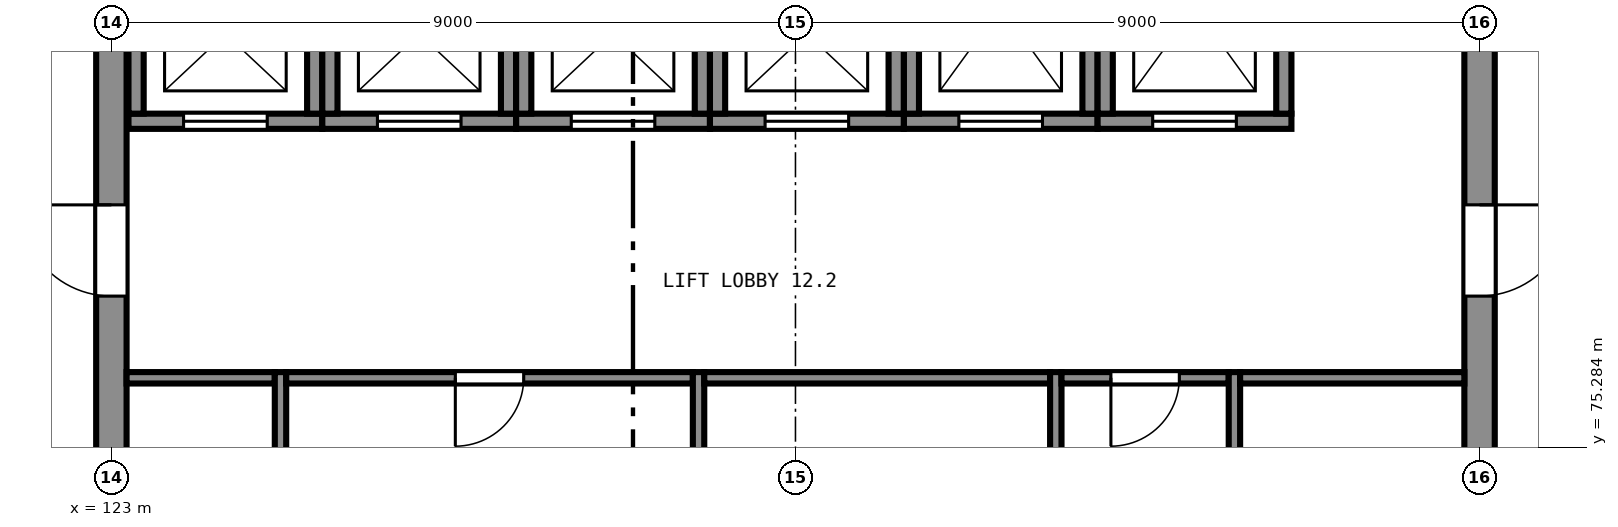
"""IFC4 building model, lengths in metres.
Left out: names, types, materials, properties, quantities, classifications, styles, units other than length and angle.
Written with IfcOpenShell. Run it as: python <this file> out.ifc"""

import sys

from ifc_helpers import new_model, si_unit, direction, frame, frame_2d, origin, place, context, subcontext, project, spatial, rectangle, extrude, element, fill, save


model = new_model("IFC4")
c1 = context("Model", 3, precision=1e-05, world=origin(), true_north=direction((0.0, 1.0)))
c2 = subcontext(c1, "Body", "Model", "MODEL_VIEW")
j1 = project(units=[si_unit("LENGTHUNIT", "METRE"), si_unit("PLANEANGLEUNIT", "RADIAN")], contexts=[c1])
p1 = place(None, origin())
s1 = spatial("IfcSite", under=j1, at=p1, CompositionType="ELEMENT")
p2 = place(p1, origin())
s2 = spatial("IfcBuilding", under=s1, at=p2, CompositionType="ELEMENT")
p3 = place(p2, frame((0.0, 0.0, 49.5)))
s3 = spatial("IfcBuildingStorey", under=s2, at=p3, CompositionType="ELEMENT", Elevation=49.5)
p4 = place(p3, frame((141.0, 65.2, 0.0), z_axis=(0.0, 0.0, 1.0), x_axis=(0.0, 1.0, 0.0)))
e1 = element("IfcWall", 1, at=p4, inside=s3, PredefinedType="SHEAR", context=c2, shape_type="SweptSolid", body=[
    extrude(rectangle(XDim=17.6, YDim=0.4, at=frame_2d((8.8, 0.0))), origin(), (0.0, 0.0, 1.0), 4.0),
])
p5 = place(p4, frame((4.325, 0.0, 0.0)))
e2 = element("IfcOpeningElement", 2, at=p5, cuts=e1, PredefinedType="OPENING", context=c2, shape_type="SweptSolid", body=[
    extrude(rectangle(XDim=1.2, YDim=2.1, at=frame_2d((0.6, 1.05))), frame((0.0, 0.21, 0.0), z_axis=(0.0, -1.0, 0.0), x_axis=(1.0, 0.0, 0.0)), (0.0, 0.0, 1.0), 0.42),
])
p6 = place(p4, frame((12.075, 0.0, 0.0)))
e3 = element("IfcOpeningElement", 3, at=p6, cuts=e1, PredefinedType="OPENING", context=c2, shape_type="SweptSolid", body=[
    extrude(rectangle(XDim=1.2, YDim=2.1, at=frame_2d((0.6, 1.05))), frame((0.0, 0.21, 0.0), z_axis=(0.0, -1.0, 0.0), x_axis=(1.0, 0.0, 0.0)), (0.0, 0.0, 1.0), 0.42),
])
p7 = place(p3, frame((123.0, 82.8, 0.0), z_axis=(0.0, 0.0, 1.0), x_axis=(0.0, -1.0, 0.0)))
e4 = element("IfcWall", 4, at=p7, inside=s3, PredefinedType="SHEAR", context=c2, shape_type="SweptSolid", body=[
    extrude(rectangle(XDim=17.6, YDim=0.4, at=frame_2d((8.8, 0.0))), origin(), (0.0, 0.0, 1.0), 4.0),
])
p8 = place(p7, frame((12.075, 0.0, 0.0)))
e5 = element("IfcOpeningElement", 5, at=p8, cuts=e4, PredefinedType="OPENING", context=c2, shape_type="SweptSolid", body=[
    extrude(rectangle(XDim=1.2, YDim=2.1, at=frame_2d((0.6, 1.05))), frame((0.0, 0.21, 0.0), z_axis=(0.0, -1.0, 0.0), x_axis=(1.0, 0.0, 0.0)), (0.0, 0.0, 1.0), 0.42),
])
p9 = place(p7, frame((4.325, 0.0, 0.0)))
e6 = element("IfcOpeningElement", 6, at=p9, cuts=e4, PredefinedType="OPENING", context=c2, shape_type="SweptSolid", body=[
    extrude(rectangle(XDim=1.2, YDim=2.1, at=frame_2d((0.6, 1.05))), frame((0.0, 0.21, 0.0), z_axis=(0.0, -1.0, 0.0), x_axis=(1.0, 0.0, 0.0)), (0.0, 0.0, 1.0), 0.42),
])
p10 = place(p3, frame((123.225, 79.575, 0.0), z_axis=(0.0, 0.0, 1.0), x_axis=(1.0, 0.0, 0.0)))
e7 = element("IfcWall", 7, at=p10, inside=s3, PredefinedType="SHEAR", context=c2, shape_type="SweptSolid", body=[
    extrude(rectangle(XDim=2.55, YDim=0.2, at=frame_2d((1.275, 0.0))), origin(), (0.0, 0.0, 1.0), 4.0),
])
p11 = place(p10, frame((0.725, 0.0, 0.0)))
e8 = element("IfcOpeningElement", 8, at=p11, cuts=e7, PredefinedType="OPENING", context=c2, shape_type="SweptSolid", body=[
    extrude(rectangle(XDim=1.1, YDim=2.1, at=frame_2d((0.55, 1.05))), frame((0.0, 0.11, 0.0), z_axis=(0.0, -1.0, 0.0), x_axis=(1.0, 0.0, 0.0)), (0.0, 0.0, 1.0), 0.22),
])
for number, where, z_axis, x_axis in (
    (9, (125.675, 79.675, 0.0), (0.0, 0.0, 1.0), (0.0, 1.0, 0.0)),
    (10, (123.325, 81.775, 0.0), (0.0, 0.0, 1.0), (0.0, -1.0, 0.0)),
):
    element("IfcWall", number, at=place(p3, frame(where, z_axis=z_axis, x_axis=x_axis)), inside=s3, PredefinedType="SHEAR", context=c2, shape_type="SweptSolid", body=[
        extrude(rectangle(XDim=2.1, YDim=0.2, at=frame_2d((1.05, 0.0))), origin(), (0.0, 0.0, 1.0), 4.0),
    ])
p12 = place(p3, frame((125.775, 79.575, 0.0), z_axis=(0.0, 0.0, 1.0), x_axis=(1.0, 0.0, 0.0)))
e11 = element("IfcWall", 11, at=p12, inside=s3, PredefinedType="SHEAR", context=c2, shape_type="SweptSolid", body=[
    extrude(rectangle(XDim=2.55, YDim=0.2, at=frame_2d((1.275, 0.0))), origin(), (0.0, 0.0, 1.0), 4.0),
])
p13 = place(p12, frame((0.725, 0.0, 0.0)))
e12 = element("IfcOpeningElement", 12, at=p13, cuts=e11, PredefinedType="OPENING", context=c2, shape_type="SweptSolid", body=[
    extrude(rectangle(XDim=1.1, YDim=2.1, at=frame_2d((0.55, 1.05))), frame((0.0, 0.11, 0.0), z_axis=(0.0, -1.0, 0.0), x_axis=(1.0, 0.0, 0.0)), (0.0, 0.0, 1.0), 0.22),
])
for number, where, z_axis, x_axis in (
    (13, (128.225, 79.675, 0.0), (0.0, 0.0, 1.0), (0.0, 1.0, 0.0)),
    (14, (125.875, 81.775, 0.0), (0.0, 0.0, 1.0), (0.0, -1.0, 0.0)),
):
    element("IfcWall", number, at=place(p3, frame(where, z_axis=z_axis, x_axis=x_axis)), inside=s3, PredefinedType="SHEAR", context=c2, shape_type="SweptSolid", body=[
        extrude(rectangle(XDim=2.1, YDim=0.2, at=frame_2d((1.05, 0.0))), origin(), (0.0, 0.0, 1.0), 4.0),
    ])
p14 = place(p3, frame((128.325, 79.575, 0.0), z_axis=(0.0, 0.0, 1.0), x_axis=(1.0, 0.0, 0.0)))
e15 = element("IfcWall", 15, at=p14, inside=s3, PredefinedType="SHEAR", context=c2, shape_type="SweptSolid", body=[
    extrude(rectangle(XDim=2.55, YDim=0.2, at=frame_2d((1.275, 0.0))), origin(), (0.0, 0.0, 1.0), 4.0),
])
p15 = place(p14, frame((0.725, 0.0, 0.0)))
e16 = element("IfcOpeningElement", 16, at=p15, cuts=e15, PredefinedType="OPENING", context=c2, shape_type="SweptSolid", body=[
    extrude(rectangle(XDim=1.1, YDim=2.1, at=frame_2d((0.55, 1.05))), frame((0.0, 0.11, 0.0), z_axis=(0.0, -1.0, 0.0), x_axis=(1.0, 0.0, 0.0)), (0.0, 0.0, 1.0), 0.22),
])
for number, where, z_axis, x_axis in (
    (17, (130.775, 79.675, 0.0), (0.0, 0.0, 1.0), (0.0, 1.0, 0.0)),
    (18, (128.425, 81.775, 0.0), (0.0, 0.0, 1.0), (0.0, -1.0, 0.0)),
):
    element("IfcWall", number, at=place(p3, frame(where, z_axis=z_axis, x_axis=x_axis)), inside=s3, PredefinedType="SHEAR", context=c2, shape_type="SweptSolid", body=[
        extrude(rectangle(XDim=2.1, YDim=0.2, at=frame_2d((1.05, 0.0))), origin(), (0.0, 0.0, 1.0), 4.0),
    ])
p16 = place(p3, frame((130.875, 79.575, 0.0), z_axis=(0.0, 0.0, 1.0), x_axis=(1.0, 0.0, 0.0)))
e19 = element("IfcWall", 19, at=p16, inside=s3, PredefinedType="SHEAR", context=c2, shape_type="SweptSolid", body=[
    extrude(rectangle(XDim=2.55, YDim=0.2, at=frame_2d((1.275, 0.0))), origin(), (0.0, 0.0, 1.0), 4.0),
])
p17 = place(p16, frame((0.725, 0.0, 0.0)))
e20 = element("IfcOpeningElement", 20, at=p17, cuts=e19, PredefinedType="OPENING", context=c2, shape_type="SweptSolid", body=[
    extrude(rectangle(XDim=1.1, YDim=2.1, at=frame_2d((0.55, 1.05))), frame((0.0, 0.11, 0.0), z_axis=(0.0, -1.0, 0.0), x_axis=(1.0, 0.0, 0.0)), (0.0, 0.0, 1.0), 0.22),
])
for number, where, z_axis, x_axis in (
    (21, (133.325, 79.675, 0.0), (0.0, 0.0, 1.0), (0.0, 1.0, 0.0)),
    (22, (130.975, 81.775, 0.0), (0.0, 0.0, 1.0), (0.0, -1.0, 0.0)),
):
    element("IfcWall", number, at=place(p3, frame(where, z_axis=z_axis, x_axis=x_axis)), inside=s3, PredefinedType="SHEAR", context=c2, shape_type="SweptSolid", body=[
        extrude(rectangle(XDim=2.1, YDim=0.2, at=frame_2d((1.05, 0.0))), origin(), (0.0, 0.0, 1.0), 4.0),
    ])
p18 = place(p3, frame((133.425, 79.575, 0.0), z_axis=(0.0, 0.0, 1.0), x_axis=(1.0, 0.0, 0.0)))
e23 = element("IfcWall", 23, at=p18, inside=s3, PredefinedType="SHEAR", context=c2, shape_type="SweptSolid", body=[
    extrude(rectangle(XDim=2.55, YDim=0.2, at=frame_2d((1.275, 0.0))), origin(), (0.0, 0.0, 1.0), 4.0),
])
p19 = place(p18, frame((0.725, 0.0, 0.0)))
e24 = element("IfcOpeningElement", 24, at=p19, cuts=e23, PredefinedType="OPENING", context=c2, shape_type="SweptSolid", body=[
    extrude(rectangle(XDim=1.1, YDim=2.1, at=frame_2d((0.55, 1.05))), frame((0.0, 0.11, 0.0), z_axis=(0.0, -1.0, 0.0), x_axis=(1.0, 0.0, 0.0)), (0.0, 0.0, 1.0), 0.22),
])
for number, where, z_axis, x_axis in (
    (25, (135.875, 79.675, 0.0), (0.0, 0.0, 1.0), (0.0, 1.0, 0.0)),
    (26, (133.525, 82.475, 0.0), (0.0, 0.0, 1.0), (0.0, -1.0, 0.0)),
):
    element("IfcWall", number, at=place(p3, frame(where, z_axis=z_axis, x_axis=x_axis)), inside=s3, PredefinedType="SHEAR", context=c2, shape_type="SweptSolid", body=[
        extrude(rectangle(XDim=2.8, YDim=0.2, at=frame_2d((1.4, 0.0))), origin(), (0.0, 0.0, 1.0), 4.0),
    ])
p20 = place(p3, frame((135.975, 79.575, 0.0), z_axis=(0.0, 0.0, 1.0), x_axis=(1.0, 0.0, 0.0)))
e27 = element("IfcWall", 27, at=p20, inside=s3, PredefinedType="SHEAR", context=c2, shape_type="SweptSolid", body=[
    extrude(rectangle(XDim=2.55, YDim=0.2, at=frame_2d((1.275, 0.0))), origin(), (0.0, 0.0, 1.0), 4.0),
])
p21 = place(p20, frame((0.725, 0.0, 0.0)))
e28 = element("IfcOpeningElement", 28, at=p21, cuts=e27, PredefinedType="OPENING", context=c2, shape_type="SweptSolid", body=[
    extrude(rectangle(XDim=1.1, YDim=2.1, at=frame_2d((0.55, 1.05))), frame((0.0, 0.11, 0.0), z_axis=(0.0, -1.0, 0.0), x_axis=(1.0, 0.0, 0.0)), (0.0, 0.0, 1.0), 0.22),
])
for number, where, z_axis, x_axis in (
    (29, (138.425, 79.675, 0.0), (0.0, 0.0, 1.0), (0.0, 1.0, 0.0)),
    (30, (136.075, 82.475, 0.0), (0.0, 0.0, 1.0), (0.0, -1.0, 0.0)),
):
    element("IfcWall", number, at=place(p3, frame(where, z_axis=z_axis, x_axis=x_axis)), inside=s3, PredefinedType="SHEAR", context=c2, shape_type="SweptSolid", body=[
        extrude(rectangle(XDim=2.8, YDim=0.2, at=frame_2d((1.4, 0.0))), origin(), (0.0, 0.0, 1.0), 4.0),
    ])
p22 = place(p3, frame((125.225, 71.725, 0.0), z_axis=(0.0, 0.0, 1.0), x_axis=(0.0, 1.0, 0.0)))
e31 = element("IfcWall", 31, at=p22, inside=s3, PredefinedType="PARTITIONING", context=c2, shape_type="SweptSolid", body=[
    extrude(rectangle(XDim=4.55, YDim=0.15, at=frame_2d((2.275, 0.0))), origin(), (0.0, 0.0, 1.0), 3.58),
])
p23 = place(p3, frame((123.2, 76.2, 0.0), z_axis=(0.0, 0.0, 1.0), x_axis=(1.0, 0.0, 0.0)))
e32 = element("IfcWall", 32, at=p23, inside=s3, PredefinedType="PARTITIONING", context=c2, shape_type="SweptSolid", body=[
    extrude(rectangle(XDim=1.95, YDim=0.15, at=frame_2d((0.975, 0.0))), origin(), (0.0, 0.0, 1.0), 3.58),
])
p24 = place(p3, frame((130.725, 71.725, 0.0), z_axis=(0.0, 0.0, 1.0), x_axis=(0.0, 1.0, 0.0)))
e33 = element("IfcWall", 33, at=p24, inside=s3, PredefinedType="PARTITIONING", context=c2, shape_type="SweptSolid", body=[
    extrude(rectangle(XDim=4.55, YDim=0.15, at=frame_2d((2.275, 0.0))), origin(), (0.0, 0.0, 1.0), 3.58),
])
p25 = place(p3, frame((125.3, 76.2, 0.0), z_axis=(0.0, 0.0, 1.0), x_axis=(1.0, 0.0, 0.0)))
e34 = element("IfcWall", 34, at=p25, inside=s3, PredefinedType="PARTITIONING", context=c2, shape_type="SweptSolid", body=[
    extrude(rectangle(XDim=5.35, YDim=0.15, at=frame_2d((2.675, 0.0))), origin(), (0.0, 0.0, 1.0), 3.58),
])
p26 = place(p25, frame((2.225, 0.0, 0.0)))
e35 = element("IfcOpeningElement", 35, at=p26, cuts=e34, PredefinedType="OPENING", context=c2, shape_type="SweptSolid", body=[
    extrude(rectangle(XDim=0.9, YDim=2.1, at=frame_2d((0.45, 1.05))), frame((0.0, 0.085, 0.0), z_axis=(0.0, -1.0, 0.0), x_axis=(1.0, 0.0, 0.0)), (0.0, 0.0, 1.0), 0.17),
])
p27 = place(p3, frame((135.425, 71.725, 0.0), z_axis=(0.0, 0.0, 1.0), x_axis=(0.0, 1.0, 0.0)))
e36 = element("IfcWall", 36, at=p27, inside=s3, PredefinedType="PARTITIONING", context=c2, shape_type="SweptSolid", body=[
    extrude(rectangle(XDim=4.55, YDim=0.15, at=frame_2d((2.275, 0.0))), origin(), (0.0, 0.0, 1.0), 3.58),
])
p28 = place(p3, frame((130.8, 76.2, 0.0), z_axis=(0.0, 0.0, 1.0), x_axis=(1.0, 0.0, 0.0)))
e37 = element("IfcWall", 37, at=p28, inside=s3, PredefinedType="PARTITIONING", context=c2, shape_type="SweptSolid", body=[
    extrude(rectangle(XDim=4.55, YDim=0.15, at=frame_2d((2.275, 0.0))), origin(), (0.0, 0.0, 1.0), 3.58),
])
p29 = place(p3, frame((137.775, 71.725, 0.0), z_axis=(0.0, 0.0, 1.0), x_axis=(0.0, 1.0, 0.0)))
e38 = element("IfcWall", 38, at=p29, inside=s3, PredefinedType="PARTITIONING", context=c2, shape_type="SweptSolid", body=[
    extrude(rectangle(XDim=4.55, YDim=0.15, at=frame_2d((2.275, 0.0))), origin(), (0.0, 0.0, 1.0), 3.58),
])
p30 = place(p3, frame((135.5, 76.2, 0.0), z_axis=(0.0, 0.0, 1.0), x_axis=(1.0, 0.0, 0.0)))
e39 = element("IfcWall", 39, at=p30, inside=s3, PredefinedType="PARTITIONING", context=c2, shape_type="SweptSolid", body=[
    extrude(rectangle(XDim=2.2, YDim=0.15, at=frame_2d((1.1, 0.0))), origin(), (0.0, 0.0, 1.0), 3.58),
])
p31 = place(p30, frame((0.65, 0.0, 0.0)))
e40 = element("IfcOpeningElement", 40, at=p31, cuts=e39, PredefinedType="OPENING", context=c2, shape_type="SweptSolid", body=[
    extrude(rectangle(XDim=0.9, YDim=2.1, at=frame_2d((0.45, 1.05))), frame((0.0, 0.085, 0.0), z_axis=(0.0, -1.0, 0.0), x_axis=(1.0, 0.0, 0.0)), (0.0, 0.0, 1.0), 0.17),
])
p32 = place(p3, frame((137.85, 76.2, 0.0), z_axis=(0.0, 0.0, 1.0), x_axis=(1.0, 0.0, 0.0)))
e41 = element("IfcWall", 41, at=p32, inside=s3, PredefinedType="PARTITIONING", context=c2, shape_type="SweptSolid", body=[
    extrude(rectangle(XDim=2.95, YDim=0.15, at=frame_2d((1.475, 0.0))), origin(), (0.0, 0.0, 1.0), 3.58),
])
p33 = place(p11, origin())
e42 = element("IfcDoor", 42, at=p33, inside=s3, OperationType="SLIDING_TO_LEFT", PredefinedType="DOOR", context=c2, shape_type="SweptSolid", body=[
    extrude(rectangle(XDim=1.1, YDim=2.1, at=frame_2d((0.55, 1.05))), frame((0.0, 0.025, 0.0), z_axis=(0.0, -1.0, 0.0), x_axis=(1.0, 0.0, 0.0)), (0.0, 0.0, 1.0), 0.05),
])
fill(e8, e42)
p34 = place(p13, origin())
e43 = element("IfcDoor", 43, at=p34, inside=s3, OperationType="SLIDING_TO_LEFT", PredefinedType="DOOR", context=c2, shape_type="SweptSolid", body=[
    extrude(rectangle(XDim=1.1, YDim=2.1, at=frame_2d((0.55, 1.05))), frame((0.0, 0.025, 0.0), z_axis=(0.0, -1.0, 0.0), x_axis=(1.0, 0.0, 0.0)), (0.0, 0.0, 1.0), 0.05),
])
fill(e12, e43)
p35 = place(p15, origin())
e44 = element("IfcDoor", 44, at=p35, inside=s3, OperationType="SLIDING_TO_LEFT", PredefinedType="DOOR", context=c2, shape_type="SweptSolid", body=[
    extrude(rectangle(XDim=1.1, YDim=2.1, at=frame_2d((0.55, 1.05))), frame((0.0, 0.025, 0.0), z_axis=(0.0, -1.0, 0.0), x_axis=(1.0, 0.0, 0.0)), (0.0, 0.0, 1.0), 0.05),
])
fill(e16, e44)
p36 = place(p17, origin())
e45 = element("IfcDoor", 45, at=p36, inside=s3, OperationType="SLIDING_TO_LEFT", PredefinedType="DOOR", context=c2, shape_type="SweptSolid", body=[
    extrude(rectangle(XDim=1.1, YDim=2.1, at=frame_2d((0.55, 1.05))), frame((0.0, 0.025, 0.0), z_axis=(0.0, -1.0, 0.0), x_axis=(1.0, 0.0, 0.0)), (0.0, 0.0, 1.0), 0.05),
])
fill(e20, e45)
p37 = place(p19, origin())
e46 = element("IfcDoor", 46, at=p37, inside=s3, OperationType="SLIDING_TO_LEFT", PredefinedType="DOOR", context=c2, shape_type="SweptSolid", body=[
    extrude(rectangle(XDim=1.1, YDim=2.1, at=frame_2d((0.55, 1.05))), frame((0.0, 0.025, 0.0), z_axis=(0.0, -1.0, 0.0), x_axis=(1.0, 0.0, 0.0)), (0.0, 0.0, 1.0), 0.05),
])
fill(e24, e46)
p38 = place(p21, origin())
e47 = element("IfcDoor", 47, at=p38, inside=s3, OperationType="SLIDING_TO_LEFT", PredefinedType="DOOR", context=c2, shape_type="SweptSolid", body=[
    extrude(rectangle(XDim=1.1, YDim=2.1, at=frame_2d((0.55, 1.05))), frame((0.0, 0.025, 0.0), z_axis=(0.0, -1.0, 0.0), x_axis=(1.0, 0.0, 0.0)), (0.0, 0.0, 1.0), 0.05),
])
fill(e28, e47)
p39 = place(p9, frame((1.2, 0.0, 0.0), z_axis=(0.0, 0.0, 1.0), x_axis=(-1.0, 0.0, 0.0)))
e48 = element("IfcDoor", 48, at=p39, inside=s3, OperationType="SINGLE_SWING_LEFT", PredefinedType="DOOR", context=c2, shape_type="SweptSolid", body=[
    extrude(rectangle(XDim=1.2, YDim=2.1, at=frame_2d((0.6, 1.05))), frame((0.0, 0.025, 0.0), z_axis=(0.0, -1.0, 0.0), x_axis=(1.0, 0.0, 0.0)), (0.0, 0.0, 1.0), 0.05),
])
fill(e6, e48)
p40 = place(p6, frame((1.2, 0.0, 0.0), z_axis=(0.0, 0.0, 1.0), x_axis=(-1.0, 0.0, 0.0)))
e49 = element("IfcDoor", 49, at=p40, inside=s3, OperationType="SINGLE_SWING_RIGHT", PredefinedType="DOOR", context=c2, shape_type="SweptSolid", body=[
    extrude(rectangle(XDim=1.2, YDim=2.1, at=frame_2d((0.6, 1.05))), frame((0.0, 0.025, 0.0), z_axis=(0.0, -1.0, 0.0), x_axis=(1.0, 0.0, 0.0)), (0.0, 0.0, 1.0), 0.05),
])
fill(e3, e49)
p41 = place(p26, frame((0.9, 0.0, 0.0), z_axis=(0.0, 0.0, 1.0), x_axis=(-1.0, 0.0, 0.0)))
e50 = element("IfcDoor", 50, at=p41, inside=s3, OperationType="SINGLE_SWING_LEFT", PredefinedType="DOOR", context=c2, shape_type="SweptSolid", body=[
    extrude(rectangle(XDim=0.9, YDim=2.1, at=frame_2d((0.45, 1.05))), frame((0.0, 0.025, 0.0), z_axis=(0.0, -1.0, 0.0), x_axis=(1.0, 0.0, 0.0)), (0.0, 0.0, 1.0), 0.05),
])
fill(e35, e50)
p42 = place(p31, frame((0.9, 0.0, 0.0), z_axis=(0.0, 0.0, 1.0), x_axis=(-1.0, 0.0, 0.0)))
e51 = element("IfcDoor", 51, at=p42, inside=s3, OperationType="SINGLE_SWING_LEFT", PredefinedType="DOOR", context=c2, shape_type="SweptSolid", body=[
    extrude(rectangle(XDim=0.9, YDim=2.1, at=frame_2d((0.45, 1.05))), frame((0.0, 0.025, 0.0), z_axis=(0.0, -1.0, 0.0), x_axis=(1.0, 0.0, 0.0)), (0.0, 0.0, 1.0), 0.05),
])
fill(e40, e51)
save(model, sys.argv[1])
